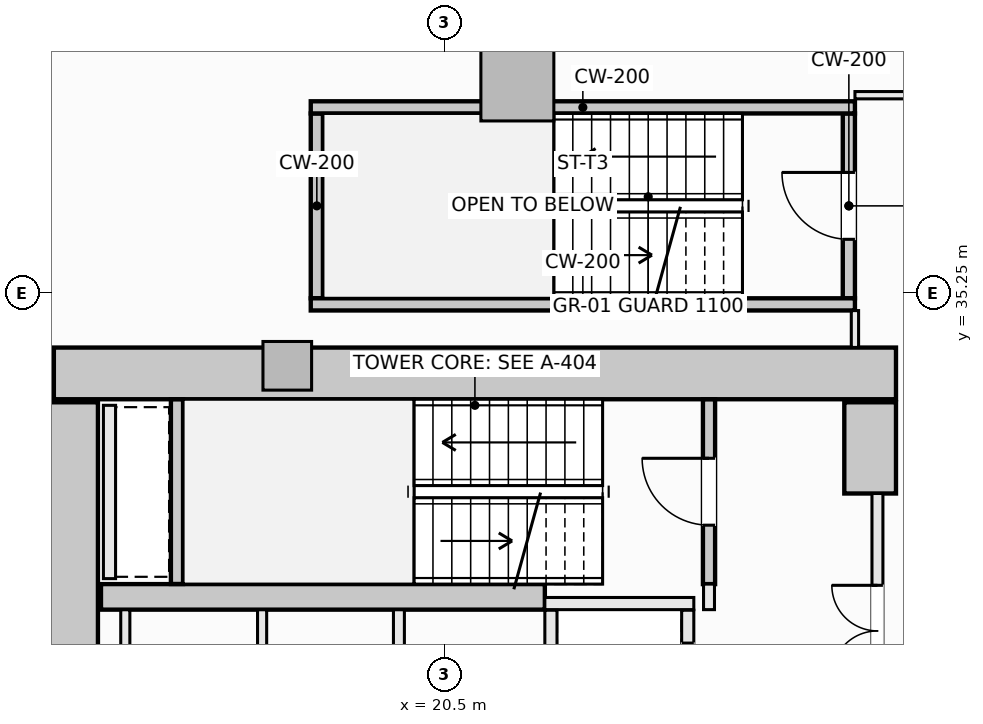
"""IFC4 building model, lengths in metres.
Left out: names, types, materials, properties, quantities, classifications, styles, units other than length and angle.
Written with IfcOpenShell. Run it as: python <this file> out.ifc"""

import sys

from ifc_helpers import new_model, si_unit, direction, frame, frame_2d, origin, origin_2d, place, context, subcontext, project, spatial, rectangle, extrude, element, fill, save


model = new_model("IFC4")
c1 = context("Model", 3, precision=1e-05, world=origin(), true_north=direction((0.0, 1.0)))
c2 = subcontext(c1, "Body", "Model", "MODEL_VIEW")
j1 = project(units=[si_unit("LENGTHUNIT", "METRE"), si_unit("PLANEANGLEUNIT", "RADIAN")], contexts=[c1])
p1 = place(None, origin())
s1 = spatial("IfcSite", under=j1, at=p1, CompositionType="ELEMENT")
p2 = place(p1, origin())
s2 = spatial("IfcBuilding", under=s1, at=p2, CompositionType="ELEMENT")
p3 = place(p2, frame((0.0, 0.0, 53.45)))
s3 = spatial("IfcBuildingStorey", under=s2, at=p3, CompositionType="ELEMENT", Elevation=53.45)
p4 = place(p3, frame((14.075, 33.925, -0.28), z_axis=(0.0, 0.0, 1.0), x_axis=(1.0, 0.0, 0.0)))
e1 = element("IfcWall", 1, at=p4, inside=s3, PredefinedType="SHEAR", context=c2, shape_type="SweptSolid", body=[
    extrude(rectangle(XDim=13.85, YDim=0.85, at=frame_2d((6.925, 0.0))), origin(), (0.0, 0.0, 1.0), 3.85),
])
p5 = place(p3, frame((14.375, 20.55, -0.28), z_axis=(0.0, 0.0, 1.0), x_axis=(0.0, 1.0, 0.0)))
e2 = element("IfcWall", 2, at=p5, inside=s3, PredefinedType="SHEAR", context=c2, shape_type="SweptSolid", body=[
    extrude(rectangle(XDim=12.9, YDim=0.85, at=frame_2d((6.45, 0.0))), origin(), (0.0, 0.0, 1.0), 3.85),
])
p6 = place(p3, frame((27.5, 31.95, -0.28), z_axis=(0.0, 0.0, 1.0), x_axis=(0.0, 1.0, 0.0)))
e3 = element("IfcWall", 3, at=p6, inside=s3, PredefinedType="SHEAR", context=c2, shape_type="SweptSolid", body=[
    extrude(rectangle(XDim=1.5, YDim=0.85, at=frame_2d((0.75, 0.0))), origin(), (0.0, 0.0, 1.0), 3.85),
])
p7 = place(p3, frame((14.85, 30.25, -0.28), z_axis=(0.0, 0.0, 1.0), x_axis=(1.0, 0.0, 0.0)))
e4 = element("IfcWall", 4, at=p7, inside=s3, PredefinedType="SHEAR", context=c2, shape_type="SweptSolid", body=[
    extrude(rectangle(XDim=7.3, YDim=0.42, at=frame_2d((3.65, 0.0))), origin(), (0.0, 0.0, 1.0), 3.85),
])
p8 = place(p3, frame((21.698, 38.677, -0.28), z_axis=(0.0, 0.0, 1.0), x_axis=(1.0, 0.0, 0.0)))
e5 = element("IfcColumn", 5, at=p8, inside=s3, PredefinedType="COLUMN", context=c2, shape_type="SweptSolid", body=[
    extrude(rectangle(XDim=1.2, YDim=1.2, at=origin_2d()), origin(), (0.0, 0.0, 1.0), 3.85),
])
p9 = place(p3, frame((17.914, 34.05, -0.28), z_axis=(0.0, 0.0, 1.0), x_axis=(1.0, 0.0, 0.0)))
e6 = element("IfcColumn", 6, at=p9, inside=s3, PredefinedType="PILASTER", context=c2, shape_type="SweptSolid", body=[
    extrude(rectangle(XDim=0.8, YDim=0.8, at=origin_2d()), origin(), (0.0, 0.0, 1.0), 3.85),
])
p10 = place(p3, frame((24.85, 30.46, -0.28), z_axis=(0.0, 0.0, 1.0), x_axis=(0.0, 1.0, 0.0)))
e7 = element("IfcWall", 7, at=p10, inside=s3, PredefinedType="SHEAR", context=c2, shape_type="SweptSolid", body=[
    extrude(rectangle(XDim=3.038, YDim=0.2, at=frame_2d((1.519, 0.0))), origin(), (0.0, 0.0, 1.0), 3.85),
])
p11 = place(p10, frame((0.969, 0.0, 0.28)))
e8 = element("IfcOpeningElement", 8, at=p11, cuts=e7, PredefinedType="OPENING", context=c2, shape_type="SweptSolid", body=[
    extrude(rectangle(XDim=1.1, YDim=2.15, at=frame_2d((0.55, 1.075))), frame((0.0, 0.11, 0.0), z_axis=(0.0, -1.0, 0.0), x_axis=(1.0, 0.0, 0.0)), (0.0, 0.0, 1.0), 0.22),
])
p12 = place(p3, frame((16.1, 30.462, -0.28), z_axis=(0.0, 0.0, 1.0), x_axis=(0.0, 1.0, 0.0)))
e9 = element("IfcWall", 9, at=p12, inside=s3, PredefinedType="SHEAR", context=c2, shape_type="SweptSolid", body=[
    extrude(rectangle(XDim=3.036, YDim=0.2, at=frame_2d((1.518, 0.0))), origin(), (0.0, 0.0, 1.0), 3.85),
])
p13 = place(p3, frame((27.15, 35.16, -0.28), z_axis=(0.0, 0.0, 1.0), x_axis=(0.0, 1.0, 0.0)))
e10 = element("IfcWall", 10, at=p13, inside=s3, PredefinedType="SHEAR", context=c2, shape_type="SweptSolid", body=[
    extrude(rectangle(XDim=3.04, YDim=0.2, at=frame_2d((1.52, 0.0))), origin(), (0.0, 0.0, 1.0), 3.85),
])
p14 = place(p13, frame((0.97, 0.0, 0.28)))
e11 = element("IfcOpeningElement", 11, at=p14, cuts=e10, PredefinedType="OPENING", context=c2, shape_type="SweptSolid", body=[
    extrude(rectangle(XDim=1.1, YDim=2.15, at=frame_2d((0.55, 1.075))), frame((0.0, 0.11, 0.0), z_axis=(0.0, -1.0, 0.0), x_axis=(1.0, 0.0, 0.0)), (0.0, 0.0, 1.0), 0.22),
])
p15 = place(p3, frame((18.4, 35.16, -0.28), z_axis=(0.0, 0.0, 1.0), x_axis=(0.0, 1.0, 0.0)))
e12 = element("IfcWall", 12, at=p15, inside=s3, PredefinedType="SHEAR", context=c2, shape_type="SweptSolid", body=[
    extrude(rectangle(XDim=3.04, YDim=0.2, at=frame_2d((1.52, 0.0))), origin(), (0.0, 0.0, 1.0), 3.85),
])
for number, where, z_axis, x_axis in (
    (13, (18.3, 38.3, -0.28), (0.0, 0.0, 1.0), (1.0, 0.0, 0.0)),
    (14, (18.3, 35.06, -0.28), (0.0, 0.0, 1.0), (1.0, 0.0, 0.0)),
):
    element("IfcWall", number, at=place(p3, frame(where, z_axis=z_axis, x_axis=x_axis)), inside=s3, PredefinedType="SHEAR", context=c2, shape_type="SweptSolid", body=[
        extrude(rectangle(XDim=8.95, YDim=0.2, at=frame_2d((4.475, 0.0))), origin(), (0.0, 0.0, 1.0), 3.85),
    ])
p16 = place(p3, frame((22.15, 30.14, 0.0), z_axis=(0.0, 0.0, 1.0), x_axis=(1.0, 0.0, 0.0)))
e15 = element("IfcWall", 15, at=p16, inside=s3, PredefinedType="SOLIDWALL", context=c2, shape_type="SweptSolid", body=[
    extrude(rectangle(XDim=2.45, YDim=0.2, at=frame_2d((1.225, 0.0))), origin(), (0.0, 0.0, 1.0), 3.57),
])
p17 = place(p3, frame((22.25, 27.85, 0.0), z_axis=(0.0, 0.0, 1.0), x_axis=(0.0, 1.0, 0.0)))
e16 = element("IfcWall", 16, at=p17, inside=s3, PredefinedType="SOLIDWALL", context=c2, shape_type="SweptSolid", body=[
    extrude(rectangle(XDim=2.18, YDim=0.2, at=frame_2d((1.09, 0.0))), origin(), (0.0, 0.0, 1.0), 3.57),
])
p18 = place(p3, frame((24.5, 27.85, 0.0), z_axis=(0.0, 0.0, 1.0), x_axis=(0.0, 1.0, 0.0)))
e17 = element("IfcWall", 17, at=p18, inside=s3, PredefinedType="SOLIDWALL", context=c2, shape_type="SweptSolid", body=[
    extrude(rectangle(XDim=2.18, YDim=0.2, at=frame_2d((1.09, 0.0))), origin(), (0.0, 0.0, 1.0), 3.57),
])
p19 = place(p18, frame((0.54, 0.0, 0.0)))
e18 = element("IfcOpeningElement", 18, at=p19, cuts=e17, PredefinedType="OPENING", context=c2, shape_type="SweptSolid", body=[
    extrude(rectangle(XDim=1.1, YDim=2.2, at=frame_2d((0.55, 1.1))), frame((0.0, 0.11, 0.0), z_axis=(0.0, -1.0, 0.0), x_axis=(1.0, 0.0, 0.0)), (0.0, 0.0, 1.0), 0.22),
])
p20 = place(p3, frame((14.99, 30.55, 0.0), z_axis=(0.0, 0.0, 1.0), x_axis=(0.0, 1.0, 0.0)))
e19 = element("IfcWall", 19, at=p20, inside=s3, PredefinedType="SOLIDWALL", context=c2, shape_type="SweptSolid", body=[
    extrude(rectangle(XDim=2.85, YDim=0.2, at=frame_2d((1.425, 0.0))), origin(), (0.0, 0.0, 1.0), 3.57),
])
p21 = place(p3, frame((24.85, 30.04, 0.0), z_axis=(0.0, 0.0, 1.0), x_axis=(0.0, 1.0, 0.0)))
e20 = element("IfcWall", 20, at=p21, inside=s3, PredefinedType="SOLIDWALL", context=c2, shape_type="SweptSolid", body=[
    extrude(rectangle(XDim=0.42, YDim=0.18, at=frame_2d((0.21, 0.0))), origin(), (0.0, 0.0, 1.0), 3.57),
])
p22 = place(p3, frame((27.62, 22.05, 0.0), z_axis=(0.0, 0.0, 1.0), x_axis=(0.0, 1.0, 0.0)))
e21 = element("IfcWall", 21, at=p22, inside=s3, PredefinedType="SOLIDWALL", context=c2, shape_type="SweptSolid", body=[
    extrude(rectangle(XDim=9.9, YDim=0.18, at=frame_2d((4.95, 0.0))), origin(), (0.0, 0.0, 1.0), 2.662),
])
p23 = place(p22, frame((4.475, 0.0, 0.0)))
e22 = element("IfcOpeningElement", 22, at=p23, cuts=e21, PredefinedType="OPENING", context=c2, shape_type="SweptSolid", body=[
    extrude(rectangle(XDim=0.95, YDim=2.1, at=frame_2d((0.475, 1.05))), frame((0.0, 0.1, 0.0), z_axis=(0.0, -1.0, 0.0), x_axis=(1.0, 0.0, 0.0)), (0.0, 0.0, 1.0), 0.2),
])
p24 = place(p22, frame((6.89, 0.0, 0.0)))
e23 = element("IfcOpeningElement", 23, at=p24, cuts=e21, PredefinedType="OPENING", context=c2, shape_type="SweptSolid", body=[
    extrude(rectangle(XDim=1.5, YDim=2.2, at=frame_2d((0.75, 1.1))), frame((0.0, 0.1, 0.0), z_axis=(0.0, -1.0, 0.0), x_axis=(1.0, 0.0, 0.0)), (0.0, 0.0, 1.0), 0.2),
])
p25 = place(p22, frame((1.51, 0.0, 0.0)))
e24 = element("IfcOpeningElement", 24, at=p25, cuts=e21, PredefinedType="OPENING", context=c2, shape_type="SweptSolid", body=[
    extrude(rectangle(XDim=1.5, YDim=2.2, at=frame_2d((0.75, 1.1))), frame((0.0, 0.1, 0.0), z_axis=(0.0, -1.0, 0.0), x_axis=(1.0, 0.0, 0.0)), (0.0, 0.0, 1.0), 0.2),
])
p26 = place(p3, frame((15.25, 27.932, 0.0), z_axis=(0.0, 0.0, 1.0), x_axis=(0.0, 1.0, 0.0)))
e25 = element("IfcWall", 25, at=p26, inside=s3, PredefinedType="PARTITIONING", context=c2, shape_type="SweptSolid", body=[
    extrude(rectangle(XDim=2.106, YDim=0.15, at=frame_2d((1.053, 0.0))), origin(), (0.0, 0.0, 1.0), 3.57),
])
p27 = place(p3, frame((19.75, 27.932, 0.0), z_axis=(0.0, 0.0, 1.0), x_axis=(0.0, 1.0, 0.0)))
e26 = element("IfcWall", 26, at=p27, inside=s3, PredefinedType="SOLIDWALL", context=c2, shape_type="SweptSolid", body=[
    extrude(rectangle(XDim=2.106, YDim=0.18, at=frame_2d((1.053, 0.0))), origin(), (0.0, 0.0, 1.0), 3.57),
])
p28 = place(p3, frame((17.5, 27.932, 0.0), z_axis=(0.0, 0.0, 1.0), x_axis=(0.0, 1.0, 0.0)))
e27 = element("IfcWall", 27, at=p28, inside=s3, PredefinedType="PARTITIONING", context=c2, shape_type="SweptSolid", body=[
    extrude(rectangle(XDim=2.106, YDim=0.15, at=frame_2d((1.053, 0.0))), origin(), (0.0, 0.0, 1.0), 3.57),
])
p29 = place(p3, frame((27.25, 34.352, 0.0), z_axis=(0.0, 0.0, 1.0), x_axis=(0.0, 1.0, 0.0)))
e28 = element("IfcWall", 28, at=p29, inside=s3, PredefinedType="PARTITIONING", context=c2, shape_type="SweptSolid", body=[
    extrude(rectangle(XDim=0.606, YDim=0.12, at=frame_2d((0.303, 0.0))), origin(), (0.0, 0.0, 1.0), 3.57),
])
p30 = place(p3, frame((27.25, 38.5, 0.0), z_axis=(0.0, 0.0, 1.0), x_axis=(1.0, 0.0, 0.0)))
e29 = element("IfcWall", 29, at=p30, inside=s3, PredefinedType="PARTITIONING", context=c2, shape_type="SweptSolid", body=[
    extrude(rectangle(XDim=2.53, YDim=0.12, at=frame_2d((1.265, 0.0))), origin(), (0.0, 0.0, 1.0), 3.57),
])
p31 = place(p11, origin())
e30 = element("IfcDoor", 30, at=p31, inside=s3, OperationType="SINGLE_SWING_RIGHT", PredefinedType="DOOR", context=c2, shape_type="SweptSolid", body=[
    extrude(rectangle(XDim=1.1, YDim=2.15, at=frame_2d((0.55, 1.075))), frame((0.0, 0.025, 0.0), z_axis=(0.0, -1.0, 0.0), x_axis=(1.0, 0.0, 0.0)), (0.0, 0.0, 1.0), 0.05),
])
fill(e8, e30)
p32 = place(p14, origin())
e31 = element("IfcDoor", 31, at=p32, inside=s3, OperationType="SINGLE_SWING_RIGHT", PredefinedType="DOOR", context=c2, shape_type="SweptSolid", body=[
    extrude(rectangle(XDim=1.1, YDim=2.15, at=frame_2d((0.55, 1.075))), frame((0.0, 0.025, 0.0), z_axis=(0.0, -1.0, 0.0), x_axis=(1.0, 0.0, 0.0)), (0.0, 0.0, 1.0), 0.05),
])
fill(e11, e31)
p33 = place(p19, origin())
e32 = element("IfcDoor", 32, at=p33, inside=s3, OperationType="SLIDING_TO_LEFT", PredefinedType="DOOR", context=c2, shape_type="SweptSolid", body=[
    extrude(rectangle(XDim=1.1, YDim=2.2, at=frame_2d((0.55, 1.1))), frame((0.0, 0.025, 0.0), z_axis=(0.0, -1.0, 0.0), x_axis=(1.0, 0.0, 0.0)), (0.0, 0.0, 1.0), 0.05),
])
fill(e18, e32)
p34 = place(p24, origin())
e33 = element("IfcDoor", 33, at=p34, inside=s3, OperationType="DOUBLE_DOOR_SINGLE_SWING", PredefinedType="DOOR", context=c2, shape_type="SweptSolid", body=[
    extrude(rectangle(XDim=1.5, YDim=2.2, at=frame_2d((0.75, 1.1))), frame((0.0, 0.025, 0.0), z_axis=(0.0, -1.0, 0.0), x_axis=(1.0, 0.0, 0.0)), (0.0, 0.0, 1.0), 0.05),
])
fill(e23, e33)
save(model, sys.argv[1])
